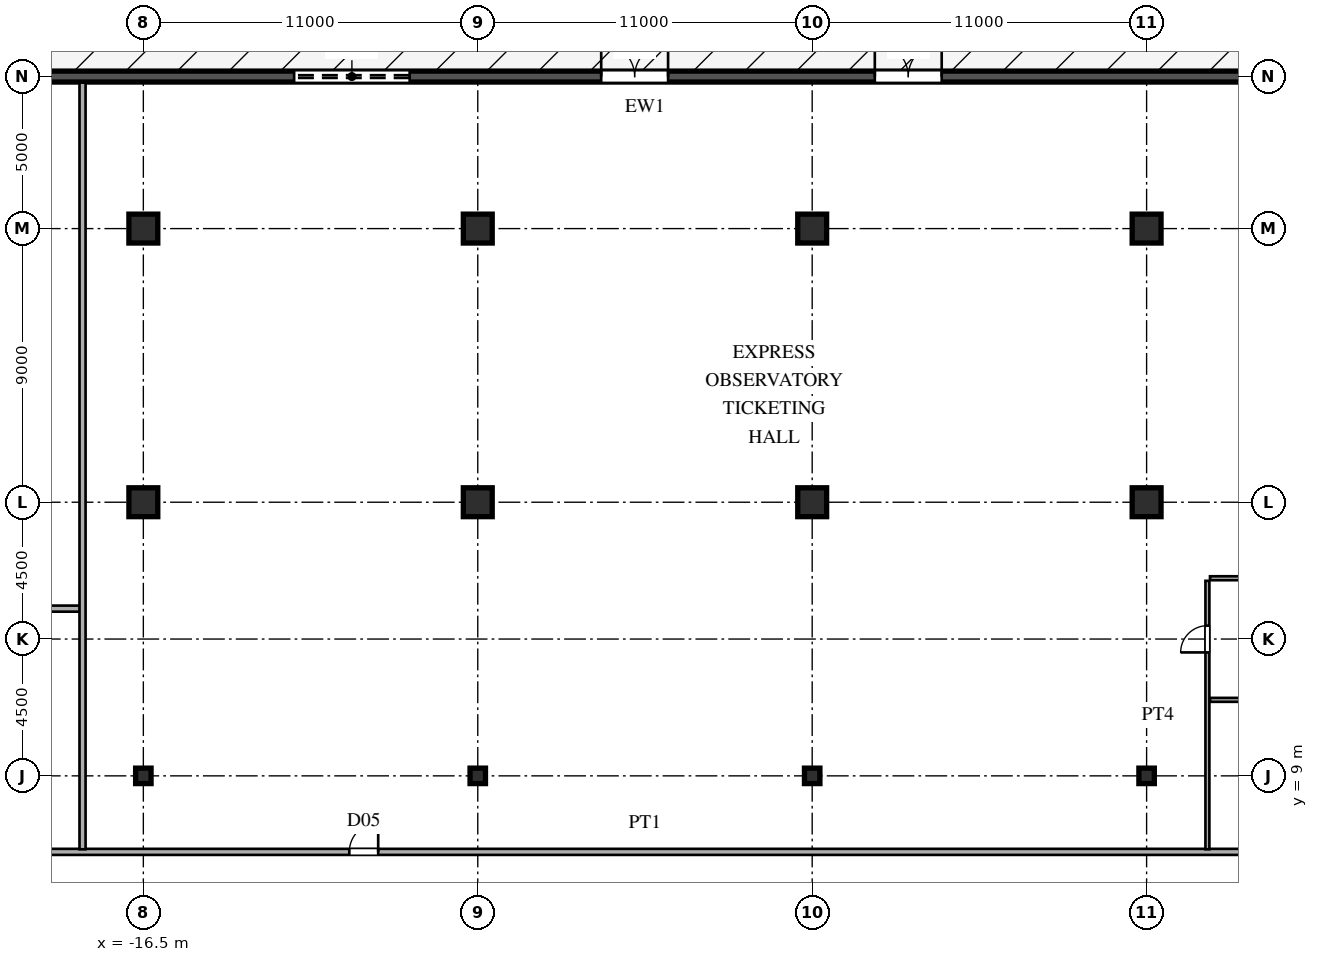
"""IFC4 building model, lengths in metres.
Left out: names, types, materials, properties, quantities, classifications, styles, units other than length and angle.
Written with IfcOpenShell. Run it as: python <this file> out.ifc"""

import sys

from ifc_helpers import new_model, si_unit, direction, frame, frame_2d, origin, origin_2d, place, context, subcontext, project, spatial, rectangle, hollow_circle, extrude, source, transform, mapped, element, fill, save


model = new_model("IFC4")
c1 = context("Model", 3, precision=1e-05, world=origin(), true_north=direction((0.0, 1.0)))
c2 = subcontext(c1, "Body", "Model", "MODEL_VIEW")
j1 = project(units=[si_unit("LENGTHUNIT", "METRE"), si_unit("PLANEANGLEUNIT", "RADIAN")], contexts=[c1])
p1 = place(None, origin())
s1 = spatial("IfcSite", under=j1, at=p1, CompositionType="ELEMENT")
p2 = place(p1, origin())
s2 = spatial("IfcBuilding", under=s1, at=p2, CompositionType="ELEMENT")
p3 = place(p2, origin())
s3 = spatial("IfcBuildingStorey", under=s2, at=p3, CompositionType="ELEMENT", Elevation=0.0)
m1 = source(origin(), c2, "Body", "SweptSolid", [
    extrude(hollow_circle(Radius=0.254, WallThickness=0.019, at=origin_2d()), origin(), (0.0, 0.0, 1.0), 5.4),
])
p4 = place(p3, frame((-16.5, 9.0, 0.0), z_axis=(0.0, 0.0, 1.0), x_axis=(1.0, 0.0, 0.0)))
e1 = element("IfcColumn", 1, at=p4, inside=s3, PredefinedType="COLUMN", context=c2, shape_type="MappedRepresentation", body=[
    mapped(m1, transform((0.0, 0.0, 0.0), scale=1.0)),
])
m2 = source(origin(), c2, "Body", "SweptSolid", [
    extrude(rectangle(XDim=0.95, YDim=0.95, at=origin_2d()), origin(), (0.0, 0.0, 1.0), 5.4),
])
for number, where, z_axis, x_axis in (
    (2, (-16.5, 18.0, 0.0), (0.0, 0.0, 1.0), (1.0, 0.0, 0.0)),
    (3, (-16.5, 27.0, 0.0), (0.0, 0.0, 1.0), (1.0, 0.0, 0.0)),
):
    element("IfcColumn", number, at=place(p3, frame(where, z_axis=z_axis, x_axis=x_axis)), inside=s3, PredefinedType="COLUMN", context=c2, shape_type="MappedRepresentation", body=[
        mapped(m2, transform((0.0, 0.0, 0.0), scale=1.0)),
    ])
p5 = place(p3, frame((-5.5, 9.0, 0.0), z_axis=(0.0, 0.0, 1.0), x_axis=(1.0, 0.0, 0.0)))
e4 = element("IfcColumn", 4, at=p5, inside=s3, PredefinedType="COLUMN", context=c2, shape_type="MappedRepresentation", body=[
    mapped(m1, transform((0.0, 0.0, 0.0), scale=1.0)),
])
for number, where, z_axis, x_axis in (
    (5, (-5.5, 18.0, 0.0), (0.0, 0.0, 1.0), (1.0, 0.0, 0.0)),
    (6, (-5.5, 27.0, 0.0), (0.0, 0.0, 1.0), (1.0, 0.0, 0.0)),
):
    element("IfcColumn", number, at=place(p3, frame(where, z_axis=z_axis, x_axis=x_axis)), inside=s3, PredefinedType="COLUMN", context=c2, shape_type="MappedRepresentation", body=[
        mapped(m2, transform((0.0, 0.0, 0.0), scale=1.0)),
    ])
p6 = place(p3, frame((5.5, 9.0, 0.0), z_axis=(0.0, 0.0, 1.0), x_axis=(1.0, 0.0, 0.0)))
e7 = element("IfcColumn", 7, at=p6, inside=s3, PredefinedType="COLUMN", context=c2, shape_type="MappedRepresentation", body=[
    mapped(m1, transform((0.0, 0.0, 0.0), scale=1.0)),
])
for number, where, z_axis, x_axis in (
    (8, (5.5, 18.0, 0.0), (0.0, 0.0, 1.0), (1.0, 0.0, 0.0)),
    (9, (5.5, 27.0, 0.0), (0.0, 0.0, 1.0), (1.0, 0.0, 0.0)),
):
    element("IfcColumn", number, at=place(p3, frame(where, z_axis=z_axis, x_axis=x_axis)), inside=s3, PredefinedType="COLUMN", context=c2, shape_type="MappedRepresentation", body=[
        mapped(m2, transform((0.0, 0.0, 0.0), scale=1.0)),
    ])
p7 = place(p3, frame((16.5, 9.0, 0.0), z_axis=(0.0, 0.0, 1.0), x_axis=(1.0, 0.0, 0.0)))
e10 = element("IfcColumn", 10, at=p7, inside=s3, PredefinedType="COLUMN", context=c2, shape_type="MappedRepresentation", body=[
    mapped(m1, transform((0.0, 0.0, 0.0), scale=1.0)),
])
for number, where, z_axis, x_axis in (
    (11, (16.5, 18.0, 0.0), (0.0, 0.0, 1.0), (1.0, 0.0, 0.0)),
    (12, (16.5, 27.0, 0.0), (0.0, 0.0, 1.0), (1.0, 0.0, 0.0)),
):
    element("IfcColumn", number, at=place(p3, frame(where, z_axis=z_axis, x_axis=x_axis)), inside=s3, PredefinedType="COLUMN", context=c2, shape_type="MappedRepresentation", body=[
        mapped(m2, transform((0.0, 0.0, 0.0), scale=1.0)),
    ])
p8 = place(p3, frame((71.96, 32.0, 0.0), z_axis=(0.0, 0.0, 1.0), x_axis=(-1.0, 0.0, 0.0)))
e13 = element("IfcWall", 13, at=p8, inside=s3, PredefinedType="SOLIDWALL", context=c2, shape_type="SweptSolid", body=[
    extrude(rectangle(XDim=143.92, YDim=0.36, at=frame_2d((71.96, 0.0))), origin(), (0.0, 0.0, 1.0), 5.12),
])
p9 = place(p8, frame((18.0, 0.0, 0.0)))
e14 = element("IfcOpeningElement", 14, at=p9, cuts=e13, PredefinedType="OPENING", context=c2, shape_type="SweptSolid", body=[
    extrude(rectangle(XDim=2.2, YDim=2.4, at=frame_2d((1.1, 1.2))), frame((0.0, 0.19, 0.0), z_axis=(0.0, -1.0, 0.0), x_axis=(1.0, 0.0, 0.0)), (0.0, 0.0, 1.0), 0.38),
])
p10 = place(p8, frame((62.2, 0.0, 0.0)))
e15 = element("IfcOpeningElement", 15, at=p10, cuts=e13, PredefinedType="OPENING", context=c2, shape_type="SweptSolid", body=[
    extrude(rectangle(XDim=2.2, YDim=2.4, at=frame_2d((1.1, 1.2))), frame((0.0, 0.19, 0.0), z_axis=(0.0, -1.0, 0.0), x_axis=(1.0, 0.0, 0.0)), (0.0, 0.0, 1.0), 0.38),
])
p11 = place(p8, frame((71.2, 0.0, 0.0)))
e16 = element("IfcOpeningElement", 16, at=p11, cuts=e13, PredefinedType="OPENING", context=c2, shape_type="SweptSolid", body=[
    extrude(rectangle(XDim=2.2, YDim=2.4, at=frame_2d((1.1, 1.2))), frame((0.0, 0.19, 0.0), z_axis=(0.0, -1.0, 0.0), x_axis=(1.0, 0.0, 0.0)), (0.0, 0.0, 1.0), 0.38),
])
p12 = place(p8, frame((79.7, 0.0, 0.0)))
e17 = element("IfcOpeningElement", 17, at=p12, cuts=e13, PredefinedType="OPENING", context=c2, shape_type="SweptSolid", body=[
    extrude(rectangle(XDim=3.8, YDim=3.1, at=frame_2d((1.9, 1.55))), frame((0.0, 0.19, 0.0), z_axis=(0.0, -1.0, 0.0), x_axis=(1.0, 0.0, 0.0)), (0.0, 0.0, 1.0), 0.38),
])
p13 = place(p8, frame((93.2, 0.0, 0.0)))
e18 = element("IfcOpeningElement", 18, at=p13, cuts=e13, PredefinedType="OPENING", context=c2, shape_type="SweptSolid", body=[
    extrude(rectangle(XDim=1.2, YDim=2.2, at=frame_2d((0.6, 1.1))), frame((0.0, 0.19, 0.0), z_axis=(0.0, -1.0, 0.0), x_axis=(1.0, 0.0, 0.0)), (0.0, 0.0, 1.0), 0.38),
])
p14 = place(p8, frame((120.2, 0.0, 0.0)))
e19 = element("IfcOpeningElement", 19, at=p14, cuts=e13, PredefinedType="OPENING", context=c2, shape_type="SweptSolid", body=[
    extrude(rectangle(XDim=2.2, YDim=2.4, at=frame_2d((1.1, 1.2))), frame((0.0, 0.19, 0.0), z_axis=(0.0, -1.0, 0.0), x_axis=(1.0, 0.0, 0.0)), (0.0, 0.0, 1.0), 0.38),
])
p15 = place(p8, frame((95.7, 0.0, 0.95)))
e20 = element("IfcOpeningElement", 20, at=p15, cuts=e13, PredefinedType="OPENING", context=c2, shape_type="SweptSolid", body=[
    extrude(rectangle(XDim=1.2, YDim=1.7, at=frame_2d((0.6, 0.85))), frame((0.0, 0.19, 0.0), z_axis=(0.0, -1.0, 0.0), x_axis=(1.0, 0.0, 0.0)), (0.0, 0.0, 1.0), 0.38),
])
p16 = place(p8, frame((8.0, 0.0, 0.95)))
e21 = element("IfcOpeningElement", 21, at=p16, cuts=e13, PredefinedType="OPENING", context=c2, shape_type="SweptSolid", body=[
    extrude(rectangle(XDim=1.5, YDim=1.9, at=frame_2d((0.75, 0.95))), frame((0.0, 0.19, 0.0), z_axis=(0.0, -1.0, 0.0), x_axis=(1.0, 0.0, 0.0)), (0.0, 0.0, 1.0), 0.38),
])
p17 = place(p8, frame((28.0, 0.0, 0.95)))
e22 = element("IfcOpeningElement", 22, at=p17, cuts=e13, PredefinedType="OPENING", context=c2, shape_type="SweptSolid", body=[
    extrude(rectangle(XDim=1.5, YDim=1.9, at=frame_2d((0.75, 0.95))), frame((0.0, 0.19, 0.0), z_axis=(0.0, -1.0, 0.0), x_axis=(1.0, 0.0, 0.0)), (0.0, 0.0, 1.0), 0.38),
])
p18 = place(p8, frame((36.0, 0.0, 0.95)))
e23 = element("IfcOpeningElement", 23, at=p18, cuts=e13, PredefinedType="OPENING", context=c2, shape_type="SweptSolid", body=[
    extrude(rectangle(XDim=1.5, YDim=1.9, at=frame_2d((0.75, 0.95))), frame((0.0, 0.19, 0.0), z_axis=(0.0, -1.0, 0.0), x_axis=(1.0, 0.0, 0.0)), (0.0, 0.0, 1.0), 0.38),
])
p19 = place(p8, frame((104.0, 0.0, 0.95)))
e24 = element("IfcOpeningElement", 24, at=p19, cuts=e13, PredefinedType="OPENING", context=c2, shape_type="SweptSolid", body=[
    extrude(rectangle(XDim=1.5, YDim=1.9, at=frame_2d((0.75, 0.95))), frame((0.0, 0.19, 0.0), z_axis=(0.0, -1.0, 0.0), x_axis=(1.0, 0.0, 0.0)), (0.0, 0.0, 1.0), 0.38),
])
p20 = place(p8, frame((112.0, 0.0, 0.95)))
e25 = element("IfcOpeningElement", 25, at=p20, cuts=e13, PredefinedType="OPENING", context=c2, shape_type="SweptSolid", body=[
    extrude(rectangle(XDim=1.5, YDim=1.9, at=frame_2d((0.75, 0.95))), frame((0.0, 0.19, 0.0), z_axis=(0.0, -1.0, 0.0), x_axis=(1.0, 0.0, 0.0)), (0.0, 0.0, 1.0), 0.38),
])
p21 = place(p8, frame((130.0, 0.0, 0.95)))
e26 = element("IfcOpeningElement", 26, at=p21, cuts=e13, PredefinedType="OPENING", context=c2, shape_type="SweptSolid", body=[
    extrude(rectangle(XDim=1.5, YDim=1.9, at=frame_2d((0.75, 0.95))), frame((0.0, 0.19, 0.0), z_axis=(0.0, -1.0, 0.0), x_axis=(1.0, 0.0, 0.0)), (0.0, 0.0, 1.0), 0.38),
])
p22 = place(p3, frame((-27.12, 6.5, 0.0), z_axis=(0.0, 0.0, 1.0), x_axis=(1.0, 0.0, 0.0)))
e27 = element("IfcWall", 27, at=p22, inside=s3, PredefinedType="PARTITIONING", context=c2, shape_type="SweptSolid", body=[
    extrude(rectangle(XDim=54.24, YDim=0.2, at=frame_2d((27.12, 0.0))), origin(), (0.0, 0.0, 1.0), 5.12),
])
p23 = place(p22, frame((4.045, 0.0, 0.0)))
e28 = element("IfcOpeningElement", 28, at=p23, cuts=e27, PredefinedType="OPENING", context=c2, shape_type="SweptSolid", body=[
    extrude(rectangle(XDim=1.15, YDim=2.2, at=frame_2d((0.575, 1.1))), frame((0.0, 0.11, 0.0), z_axis=(0.0, -1.0, 0.0), x_axis=(1.0, 0.0, 0.0)), (0.0, 0.0, 1.0), 0.22),
])
p24 = place(p22, frame((17.395, 0.0, 0.0)))
e29 = element("IfcOpeningElement", 29, at=p24, cuts=e27, PredefinedType="OPENING", context=c2, shape_type="SweptSolid", body=[
    extrude(rectangle(XDim=0.95, YDim=2.15, at=frame_2d((0.475, 1.075))), frame((0.0, 0.11, 0.0), z_axis=(0.0, -1.0, 0.0), x_axis=(1.0, 0.0, 0.0)), (0.0, 0.0, 1.0), 0.22),
])
p25 = place(p22, frame((47.33, 0.0, 0.0)))
e30 = element("IfcOpeningElement", 30, at=p25, cuts=e27, PredefinedType="OPENING", context=c2, shape_type="SweptSolid", body=[
    extrude(rectangle(XDim=0.88, YDim=2.1, at=frame_2d((0.44, 1.05))), frame((0.0, 0.11, 0.0), z_axis=(0.0, -1.0, 0.0), x_axis=(1.0, 0.0, 0.0)), (0.0, 0.0, 1.0), 0.22),
])
p26 = place(p22, frame((51.68, 0.0, 0.0)))
e31 = element("IfcOpeningElement", 31, at=p26, cuts=e27, PredefinedType="OPENING", context=c2, shape_type="SweptSolid", body=[
    extrude(rectangle(XDim=0.88, YDim=2.1, at=frame_2d((0.44, 1.05))), frame((0.0, 0.11, 0.0), z_axis=(0.0, -1.0, 0.0), x_axis=(1.0, 0.0, 0.0)), (0.0, 0.0, 1.0), 0.22),
])
p27 = place(p3, frame((18.585, 11.5, 0.0), z_axis=(0.0, 0.0, 1.0), x_axis=(1.0, 0.0, 0.0)))
e32 = element("IfcWall", 32, at=p27, inside=s3, PredefinedType="PARTITIONING", context=c2, shape_type="SweptSolid", body=[
    extrude(rectangle(XDim=8.535, YDim=0.13, at=frame_2d((4.268, 0.0))), origin(), (0.0, 0.0, 1.0), 5.12),
])
p28 = place(p3, frame((-27.5, 14.5, 0.0), z_axis=(0.0, 0.0, 1.0), x_axis=(1.0, 0.0, 0.0)))
e33 = element("IfcWall", 33, at=p28, inside=s3, PredefinedType="PARTITIONING", context=c2, shape_type="SweptSolid", body=[
    extrude(rectangle(XDim=8.915, YDim=0.2, at=frame_2d((4.458, 0.0))), origin(), (0.0, 0.0, 1.0), 5.12),
])
p29 = place(p3, frame((18.585, 15.5, 0.0), z_axis=(0.0, 0.0, 1.0), x_axis=(1.0, 0.0, 0.0)))
e34 = element("IfcWall", 34, at=p29, inside=s3, PredefinedType="PARTITIONING", context=c2, shape_type="SweptSolid", body=[
    extrude(rectangle(XDim=8.915, YDim=0.13, at=frame_2d((4.458, 0.0))), origin(), (0.0, 0.0, 1.0), 5.12),
])
p30 = place(p3, frame((-18.5, 6.585, 0.0), z_axis=(0.0, 0.0, 1.0), x_axis=(0.0, 1.0, 0.0)))
e35 = element("IfcWall", 35, at=p30, inside=s3, PredefinedType="PARTITIONING", context=c2, shape_type="SweptSolid", body=[
    extrude(rectangle(XDim=25.215, YDim=0.2, at=frame_2d((12.607, 0.0))), origin(), (0.0, 0.0, 1.0), 5.12),
])
p31 = place(p3, frame((18.5, 6.585, 0.0), z_axis=(0.0, 0.0, 1.0), x_axis=(0.0, 1.0, 0.0)))
e36 = element("IfcWall", 36, at=p31, inside=s3, PredefinedType="PARTITIONING", context=c2, shape_type="SweptSolid", body=[
    extrude(rectangle(XDim=8.83, YDim=0.13, at=frame_2d((4.415, 0.0))), origin(), (0.0, 0.0, 1.0), 5.12),
])
p32 = place(p31, frame((6.475, 0.0, 0.0)))
e37 = element("IfcOpeningElement", 37, at=p32, cuts=e36, PredefinedType="OPENING", context=c2, shape_type="SweptSolid", body=[
    extrude(rectangle(XDim=0.88, YDim=2.1, at=frame_2d((0.44, 1.05))), frame((0.0, 0.075, 0.0), z_axis=(0.0, -1.0, 0.0), x_axis=(1.0, 0.0, 0.0)), (0.0, 0.0, 1.0), 0.15),
])
m3 = source(origin(), c2, "Body", "SweptSolid", [
    extrude(rectangle(XDim=2.2, YDim=2.4, at=frame_2d((1.1, 1.2))), frame((0.0, 0.025, 0.0), z_axis=(0.0, -1.0, 0.0), x_axis=(1.0, 0.0, 0.0)), (0.0, 0.0, 1.0), 0.05),
])
p33 = place(p10, frame((2.2, 0.0, 0.0), z_axis=(0.0, 0.0, 1.0), x_axis=(-1.0, 0.0, 0.0)))
e38 = element("IfcDoor", 38, at=p33, inside=s3, OperationType="DOUBLE_SWING_LEFT", PredefinedType="DOOR", context=c2, shape_type="MappedRepresentation", body=[
    mapped(m3, transform((0.0, 0.0, 0.0), scale=1.0)),
])
fill(e15, e38)
p34 = place(p11, frame((2.2, 0.0, 0.0), z_axis=(0.0, 0.0, 1.0), x_axis=(-1.0, 0.0, 0.0)))
e39 = element("IfcDoor", 39, at=p34, inside=s3, OperationType="DOUBLE_SWING_LEFT", PredefinedType="DOOR", context=c2, shape_type="MappedRepresentation", body=[
    mapped(m3, transform((0.0, 0.0, 0.0), scale=1.0)),
])
fill(e16, e39)
m4 = source(origin(), c2, "Body", "SweptSolid", [
    extrude(rectangle(XDim=3.8, YDim=3.1, at=frame_2d((1.9, 1.55))), frame((0.0, 0.025, 0.0), z_axis=(0.0, -1.0, 0.0), x_axis=(1.0, 0.0, 0.0)), (0.0, 0.0, 1.0), 0.05),
])
p35 = place(p12, frame((3.8, 0.0, 0.0), z_axis=(0.0, 0.0, 1.0), x_axis=(-1.0, 0.0, 0.0)))
e40 = element("IfcDoor", 40, at=p35, inside=s3, OperationType="ROLLINGUP", PredefinedType="GATE", context=c2, shape_type="MappedRepresentation", body=[
    mapped(m4, transform((0.0, 0.0, 0.0), scale=1.0)),
])
fill(e17, e40)
m5 = source(origin(), c2, "Body", "SweptSolid", [
    extrude(rectangle(XDim=0.95, YDim=2.15, at=frame_2d((0.475, 1.075))), frame((0.0, 0.025, 0.0), z_axis=(0.0, -1.0, 0.0), x_axis=(1.0, 0.0, 0.0)), (0.0, 0.0, 1.0), 0.05),
])
p36 = place(p24, origin())
e41 = element("IfcDoor", 41, at=p36, inside=s3, OperationType="SINGLE_SWING_RIGHT", PredefinedType="DOOR", context=c2, shape_type="MappedRepresentation", body=[
    mapped(m5, transform((0.0, 0.0, 0.0), scale=1.0)),
])
fill(e29, e41)
m6 = source(origin(), c2, "Body", "SweptSolid", [
    extrude(rectangle(XDim=0.88, YDim=2.1, at=frame_2d((0.44, 1.05))), frame((0.0, 0.025, 0.0), z_axis=(0.0, -1.0, 0.0), x_axis=(1.0, 0.0, 0.0)), (0.0, 0.0, 1.0), 0.05),
])
p37 = place(p32, origin())
e42 = element("IfcDoor", 42, at=p37, inside=s3, OperationType="SINGLE_SWING_LEFT", PredefinedType="DOOR", context=c2, shape_type="MappedRepresentation", body=[
    mapped(m6, transform((0.0, 0.0, 0.0), scale=1.0)),
])
fill(e37, e42)
save(model, sys.argv[1])
